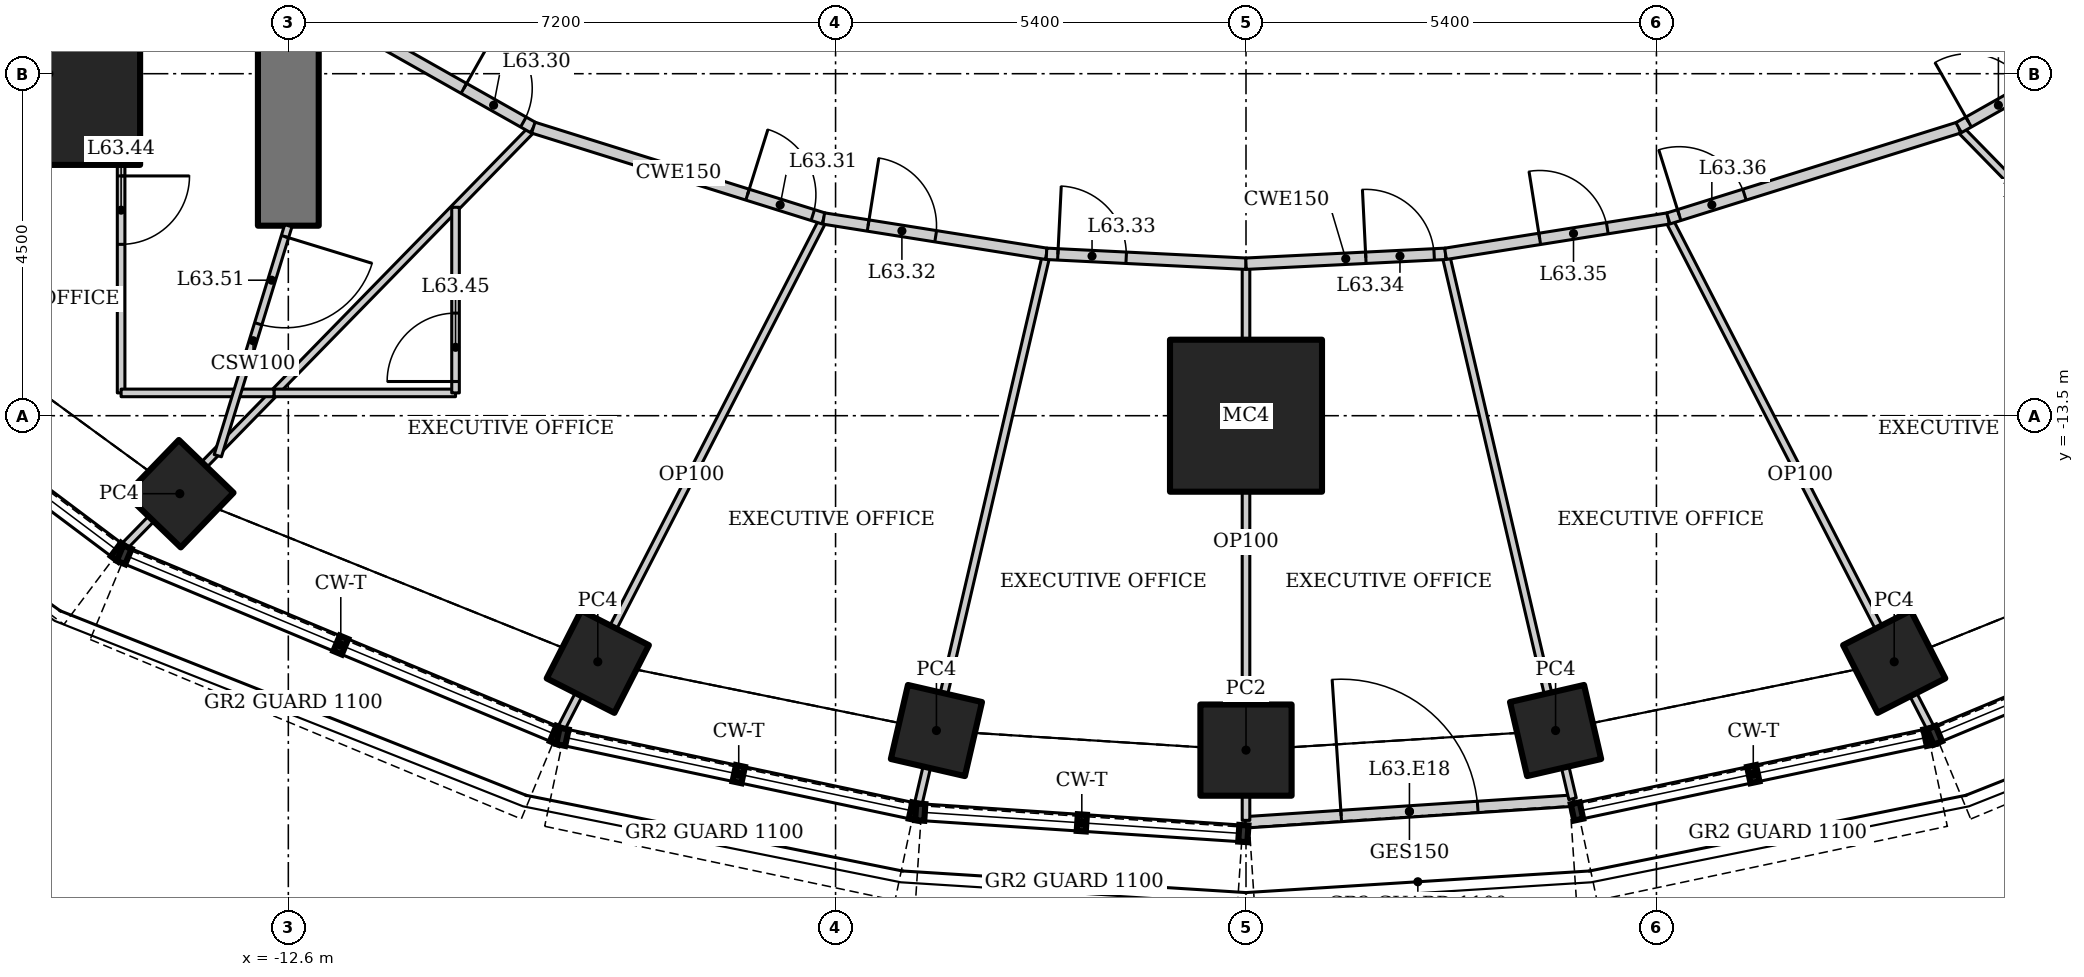
"""IFC4 building model, lengths in metres.
Left out: names, types, materials, properties, quantities, classifications, styles, units other than length and angle.
Written with IfcOpenShell. Run it as: python <this file> out.ifc"""

import sys

from ifc_helpers import new_model, si_unit, direction, frame, frame_2d, origin, origin_2d, place, context, subcontext, project, spatial, rectangle, hollow_rectangle, extrude, element, fill, save


model = new_model("IFC4")
c1 = context("Model", 3, precision=1e-05, world=origin(), true_north=direction((0.0, 1.0)))
c2 = subcontext(c1, "Body", "Model", "MODEL_VIEW")
j1 = project(units=[si_unit("LENGTHUNIT", "METRE"), si_unit("PLANEANGLEUNIT", "RADIAN")], contexts=[c1])
p1 = place(None, origin())
s1 = spatial("IfcSite", under=j1, at=p1, CompositionType="ELEMENT")
p2 = place(p1, origin())
s2 = spatial("IfcBuilding", under=s1, at=p2, CompositionType="ELEMENT")
p3 = place(p2, frame((0.0, 0.0, 270.4)))
s3 = spatial("IfcBuildingStorey", under=s2, at=p3, CompositionType="ELEMENT", Elevation=270.4)
p4 = place(p3, frame((-15.75, -9.0, 0.0), z_axis=(0.0, 0.0, 1.0), x_axis=(1.0, 0.0, 0.0)))
e1 = element("IfcColumn", 1, at=p4, inside=s3, PredefinedType="COLUMN", context=c2, shape_type="SweptSolid", body=[
    extrude(hollow_rectangle(XDim=2.4, YDim=2.4, WallThickness=0.12, at=origin_2d()), origin(), (0.0, 0.0, 1.0), 4.5),
])
p5 = place(p3, frame((0.0, -13.5, 0.0), z_axis=(0.0, 0.0, 1.0), x_axis=(1.0, 0.0, 0.0)))
e2 = element("IfcColumn", 2, at=p5, inside=s3, PredefinedType="COLUMN", context=c2, shape_type="SweptSolid", body=[
    extrude(hollow_rectangle(XDim=2.0, YDim=2.0, WallThickness=0.15, at=origin_2d()), origin(), (0.0, 0.0, 1.0), 4.5),
])
p6 = place(p3, frame((-14.028, -14.526, 0.947), z_axis=(0.0, 0.0, 1.0), x_axis=(0.694658370459, 0.719339800339, 0.0)))
e3 = element("IfcColumn", 3, at=p6, inside=s3, PredefinedType="COLUMN", context=c2, shape_type="SweptSolid", body=[
    extrude(hollow_rectangle(XDim=1.0, YDim=1.0, WallThickness=0.08, at=origin_2d()), origin(), (0.0, 0.0, 1.0), 3.553),
])
p7 = place(p3, frame((-8.528, -16.738, 0.969), z_axis=(0.0, 0.0, 1.0), x_axis=(0.45399049974, 0.891006524188, 0.0)))
e4 = element("IfcColumn", 4, at=p7, inside=s3, PredefinedType="COLUMN", context=c2, shape_type="SweptSolid", body=[
    extrude(hollow_rectangle(XDim=1.0, YDim=1.0, WallThickness=0.08, at=origin_2d()), origin(), (0.0, 0.0, 1.0), 3.531),
])
p8 = place(p3, frame((-4.073, -17.642, 0.979), z_axis=(0.0, 0.0, 1.0), x_axis=(0.224951054344, 0.974370064785, 0.0)))
e5 = element("IfcColumn", 5, at=p8, inside=s3, PredefinedType="COLUMN", context=c2, shape_type="SweptSolid", body=[
    extrude(hollow_rectangle(XDim=1.0, YDim=1.0, WallThickness=0.08, at=origin_2d()), origin(), (0.0, 0.0, 1.0), 3.521),
])
p9 = place(p3, frame((0.0, -17.9, 1.178), z_axis=(0.0, 0.0, 1.0), x_axis=(1.0, 0.0, 0.0)))
e6 = element("IfcColumn", 6, at=p9, inside=s3, PredefinedType="COLUMN", context=c2, shape_type="SweptSolid", body=[
    extrude(hollow_rectangle(XDim=1.2, YDim=1.2, WallThickness=0.1, at=origin_2d()), origin(), (0.0, 0.0, 1.0), 3.322),
])
p10 = place(p3, frame((4.073, -17.642, 0.979), z_axis=(0.0, 0.0, 1.0), x_axis=(0.974370064785, 0.224951054344, 0.0)))
e7 = element("IfcColumn", 7, at=p10, inside=s3, PredefinedType="COLUMN", context=c2, shape_type="SweptSolid", body=[
    extrude(hollow_rectangle(XDim=1.0, YDim=1.0, WallThickness=0.08, at=origin_2d()), origin(), (0.0, 0.0, 1.0), 3.521),
])
p11 = place(p3, frame((8.528, -16.738, 0.969), z_axis=(0.0, 0.0, 1.0), x_axis=(0.891006524188, 0.45399049974, 0.0)))
e8 = element("IfcColumn", 8, at=p11, inside=s3, PredefinedType="COLUMN", context=c2, shape_type="SweptSolid", body=[
    extrude(hollow_rectangle(XDim=1.0, YDim=1.0, WallThickness=0.08, at=origin_2d()), origin(), (0.0, 0.0, 1.0), 3.531),
])
p12 = place(p3, frame((-12.6, 11.0, 0.0), z_axis=(0.0, 0.0, 1.0), x_axis=(0.0, -1.0, 0.0)))
e9 = element("IfcWall", 9, at=p12, inside=s3, PredefinedType="SHEAR", context=c2, shape_type="SweptSolid", body=[
    extrude(rectangle(XDim=22.0, YDim=0.8, at=frame_2d((11.0, 0.0))), origin(), (0.0, 0.0, 1.0), 4.5),
])
p13 = place(p12, frame((10.1, 0.0, 0.0)))
e10 = element("IfcOpeningElement", 10, at=p13, cuts=e9, PredefinedType="OPENING", context=c2, shape_type="SweptSolid", body=[
    extrude(rectangle(XDim=1.8, YDim=2.1, at=frame_2d((0.9, 1.05))), frame((0.0, 0.41, 0.0), z_axis=(0.0, -1.0, 0.0), x_axis=(1.0, 0.0, 0.0)), (0.0, 0.0, 1.0), 0.82),
])
p14 = place(p3, frame((-0.01, -18.85, 0.0), z_axis=(0.0, 0.0, 1.0), x_axis=(0.997817967506, 0.066025023447, 0.0)))
e11 = element("IfcWall", 11, at=p14, inside=s3, PredefinedType="ELEMENTEDWALL", context=c2, shape_type="SweptSolid", body=[
    extrude(rectangle(XDim=4.33, YDim=0.15, at=frame_2d((2.165, 0.0))), origin(), (0.0, 0.0, 1.0), 4.35),
])
p15 = place(p14, frame((1.265, 0.0, 0.0)))
e12 = element("IfcOpeningElement", 12, at=p15, cuts=e11, PredefinedType="OPENING", context=c2, shape_type="SweptSolid", body=[
    extrude(rectangle(XDim=1.8, YDim=2.4, at=frame_2d((0.9, 1.2))), frame((0.0, 0.085, 0.0), z_axis=(0.0, -1.0, 0.0), x_axis=(1.0, 0.0, 0.0)), (0.0, 0.0, 1.0), 0.17),
])
p16 = place(p3, frame((-19.959, -11.355, 0.0), z_axis=(0.0, 0.0, 1.0), x_axis=(0.871035125561, 0.491220734537, 0.0)))
e13 = element("IfcWall", 13, at=p16, inside=s3, PredefinedType="PARTITIONING", context=c2, shape_type="SweptSolid", body=[
    extrude(rectangle(XDim=7.753, YDim=0.1, at=frame_2d((3.877, 0.0))), origin(), (0.0, 0.0, 1.0), 3.824),
])
p17 = place(p3, frame((-14.789, -15.251, 0.0), z_axis=(0.0, 0.0, 1.0), x_axis=(0.698752653188, 0.71536335499, 0.0)))
e14 = element("IfcWall", 14, at=p17, inside=s3, PredefinedType="PARTITIONING", context=c2, shape_type="SweptSolid", body=[
    extrude(rectangle(XDim=7.746, YDim=0.1, at=frame_2d((3.873, 0.0))), origin(), (0.0, 0.0, 1.0), 3.723),
])
p18 = place(p3, frame((-9.031, -17.657, 0.0), z_axis=(0.0, 0.0, 1.0), x_axis=(0.457536153323, 0.889191019074, 0.0)))
e15 = element("IfcWall", 15, at=p18, inside=s3, PredefinedType="PARTITIONING", context=c2, shape_type="SweptSolid", body=[
    extrude(rectangle(XDim=7.594, YDim=0.1, at=frame_2d((3.797, 0.0))), origin(), (0.0, 0.0, 1.0), 3.593),
])
p19 = place(p3, frame((-4.324, -18.657, 0.0), z_axis=(0.0, 0.0, 1.0), x_axis=(0.227020232271, 0.973890042119, 0.0)))
e16 = element("IfcWall", 16, at=p19, inside=s3, PredefinedType="PARTITIONING", context=c2, shape_type="SweptSolid", body=[
    extrude(rectangle(XDim=7.483, YDim=0.1, at=frame_2d((3.741, 0.0))), origin(), (0.0, 0.0, 1.0), 3.593),
])
p20 = place(p3, frame((0.0, -18.825, 0.0), z_axis=(0.0, 0.0, 1.0), x_axis=(0.0, 1.0, 0.0)))
e17 = element("IfcWall", 17, at=p20, inside=s3, PredefinedType="PARTITIONING", context=c2, shape_type="SweptSolid", body=[
    extrude(rectangle(XDim=7.325, YDim=0.1, at=frame_2d((3.662, 0.0))), origin(), (0.0, 0.0, 1.0), 3.944),
])
p21 = place(p3, frame((4.296, -18.54, 0.0), z_axis=(0.0, 0.0, 1.0), x_axis=(-0.227009478686, 0.973892548789, 0.0)))
e18 = element("IfcWall", 18, at=p21, inside=s3, PredefinedType="PARTITIONING", context=c2, shape_type="SweptSolid", body=[
    extrude(rectangle(XDim=7.363, YDim=0.1, at=frame_2d((3.681, 0.0))), origin(), (0.0, 0.0, 1.0), 3.593),
])
p22 = place(p3, frame((9.031, -17.657, 0.0), z_axis=(0.0, 0.0, 1.0), x_axis=(-0.457536153323, 0.889191019074, 0.0)))
e19 = element("IfcWall", 19, at=p22, inside=s3, PredefinedType="PARTITIONING", context=c2, shape_type="SweptSolid", body=[
    extrude(rectangle(XDim=7.594, YDim=0.1, at=frame_2d((3.797, 0.0))), origin(), (0.0, 0.0, 1.0), 3.593),
])
p23 = place(p3, frame((14.789, -15.251, 0.0), z_axis=(0.0, 0.0, 1.0), x_axis=(-0.698752653188, 0.71536335499, 0.0)))
e20 = element("IfcWall", 20, at=p23, inside=s3, PredefinedType="PARTITIONING", context=c2, shape_type="SweptSolid", body=[
    extrude(rectangle(XDim=7.746, YDim=0.1, at=frame_2d((3.873, 0.0))), origin(), (0.0, 0.0, 1.0), 3.723),
])
p24 = place(p3, frame((-13.206, -7.546, 0.0), z_axis=(0.0, 0.0, 1.0), x_axis=(0.870593853694, -0.492002379984, 0.0)))
e21 = element("IfcWall", 21, at=p24, inside=s3, PredefinedType="PARTITIONING", context=c2, shape_type="SweptSolid", body=[
    extrude(rectangle(XDim=4.398, YDim=0.15, at=frame_2d((2.199, 0.0))), origin(), (0.0, 0.0, 1.0), 4.35),
])
p25 = place(p24, frame((3.348, 0.0, 0.0)))
e22 = element("IfcOpeningElement", 22, at=p25, cuts=e21, PredefinedType="OPENING", context=c2, shape_type="SweptSolid", body=[
    extrude(rectangle(XDim=0.9, YDim=2.1, at=frame_2d((0.45, 1.05))), frame((0.0, 0.085, 0.0), z_axis=(0.0, -1.0, 0.0), x_axis=(1.0, 0.0, 0.0)), (0.0, 0.0, 1.0), 0.17),
])
p26 = place(p3, frame((-9.377, -9.71, 0.0), z_axis=(0.0, 0.0, 1.0), x_axis=(0.954393117131, -0.298552806004, 0.0)))
e23 = element("IfcWall", 23, at=p26, inside=s3, PredefinedType="PARTITIONING", context=c2, shape_type="SweptSolid", body=[
    extrude(rectangle(XDim=4.003, YDim=0.15, at=frame_2d((2.001, 0.0))), origin(), (0.0, 0.0, 1.0), 4.35),
])
p27 = place(p26, frame((2.953, 0.0, 0.0)))
e24 = element("IfcOpeningElement", 24, at=p27, cuts=e23, PredefinedType="OPENING", context=c2, shape_type="SweptSolid", body=[
    extrude(rectangle(XDim=0.9, YDim=2.1, at=frame_2d((0.45, 1.05))), frame((0.0, 0.085, 0.0), z_axis=(0.0, -1.0, 0.0), x_axis=(1.0, 0.0, 0.0)), (0.0, 0.0, 1.0), 0.17),
])
p28 = place(p3, frame((-5.556, -10.905, 0.0), z_axis=(0.0, 0.0, 1.0), x_axis=(0.987659371348, -0.156617260185, 0.0)))
e25 = element("IfcWall", 25, at=p28, inside=s3, PredefinedType="PARTITIONING", context=c2, shape_type="SweptSolid", body=[
    extrude(rectangle(XDim=2.968, YDim=0.15, at=frame_2d((1.484, 0.0))), origin(), (0.0, 0.0, 1.0), 4.35),
])
p29 = place(p28, frame((0.592, 0.0, 0.0)))
e26 = element("IfcOpeningElement", 26, at=p29, cuts=e25, PredefinedType="OPENING", context=c2, shape_type="SweptSolid", body=[
    extrude(rectangle(XDim=0.9, YDim=2.1, at=frame_2d((0.45, 1.05))), frame((0.0, 0.085, 0.0), z_axis=(0.0, -1.0, 0.0), x_axis=(1.0, 0.0, 0.0)), (0.0, 0.0, 1.0), 0.17),
])
p30 = place(p3, frame((-2.625, -11.37, 0.0), z_axis=(0.0, 0.0, 1.0), x_axis=(0.99877355978, -0.049511375313, 0.0)))
e27 = element("IfcWall", 27, at=p30, inside=s3, PredefinedType="PARTITIONING", context=c2, shape_type="SweptSolid", body=[
    extrude(rectangle(XDim=2.628, YDim=0.15, at=frame_2d((1.314, 0.0))), origin(), (0.0, 0.0, 1.0), 4.35),
])
p31 = place(p30, frame((0.15, 0.0, 0.0)))
e28 = element("IfcOpeningElement", 28, at=p31, cuts=e27, PredefinedType="OPENING", context=c2, shape_type="SweptSolid", body=[
    extrude(rectangle(XDim=0.9, YDim=2.1, at=frame_2d((0.45, 1.05))), frame((0.0, 0.085, 0.0), z_axis=(0.0, -1.0, 0.0), x_axis=(1.0, 0.0, 0.0)), (0.0, 0.0, 1.0), 0.17),
])
p32 = place(p3, frame((0.0, -11.5, 0.0), z_axis=(0.0, 0.0, 1.0), x_axis=(0.99877355978, 0.049511375313, 0.0)))
e29 = element("IfcWall", 29, at=p32, inside=s3, PredefinedType="PARTITIONING", context=c2, shape_type="SweptSolid", body=[
    extrude(rectangle(XDim=2.628, YDim=0.15, at=frame_2d((1.314, 0.0))), origin(), (0.0, 0.0, 1.0), 4.35),
])
p33 = place(p32, frame((1.578, 0.0, 0.0)))
e30 = element("IfcOpeningElement", 30, at=p33, cuts=e29, PredefinedType="OPENING", context=c2, shape_type="SweptSolid", body=[
    extrude(rectangle(XDim=0.9, YDim=2.1, at=frame_2d((0.45, 1.05))), frame((0.0, 0.085, 0.0), z_axis=(0.0, -1.0, 0.0), x_axis=(1.0, 0.0, 0.0)), (0.0, 0.0, 1.0), 0.17),
])
p34 = place(p3, frame((2.625, -11.37, 0.0), z_axis=(0.0, 0.0, 1.0), x_axis=(0.987659371348, 0.156617260185, 0.0)))
e31 = element("IfcWall", 31, at=p34, inside=s3, PredefinedType="PARTITIONING", context=c2, shape_type="SweptSolid", body=[
    extrude(rectangle(XDim=2.968, YDim=0.15, at=frame_2d((1.484, 0.0))), origin(), (0.0, 0.0, 1.0), 4.35),
])
p35 = place(p34, frame((1.255, 0.0, 0.0)))
e32 = element("IfcOpeningElement", 32, at=p35, cuts=e31, PredefinedType="OPENING", context=c2, shape_type="SweptSolid", body=[
    extrude(rectangle(XDim=0.9, YDim=2.1, at=frame_2d((0.45, 1.05))), frame((0.0, 0.085, 0.0), z_axis=(0.0, -1.0, 0.0), x_axis=(1.0, 0.0, 0.0)), (0.0, 0.0, 1.0), 0.17),
])
p36 = place(p3, frame((5.556, -10.905, 0.0), z_axis=(0.0, 0.0, 1.0), x_axis=(0.954393117131, 0.298552806004, 0.0)))
e33 = element("IfcWall", 33, at=p36, inside=s3, PredefinedType="PARTITIONING", context=c2, shape_type="SweptSolid", body=[
    extrude(rectangle(XDim=4.003, YDim=0.15, at=frame_2d((2.001, 0.0))), origin(), (0.0, 0.0, 1.0), 4.35),
])
p37 = place(p36, frame((0.15, 0.0, 0.0)))
e34 = element("IfcOpeningElement", 34, at=p37, cuts=e33, PredefinedType="OPENING", context=c2, shape_type="SweptSolid", body=[
    extrude(rectangle(XDim=0.9, YDim=2.1, at=frame_2d((0.45, 1.05))), frame((0.0, 0.085, 0.0), z_axis=(0.0, -1.0, 0.0), x_axis=(1.0, 0.0, 0.0)), (0.0, 0.0, 1.0), 0.17),
])
p38 = place(p3, frame((9.377, -9.71, 0.0), z_axis=(0.0, 0.0, 1.0), x_axis=(0.870593853694, 0.492002379984, 0.0)))
e35 = element("IfcWall", 35, at=p38, inside=s3, PredefinedType="PARTITIONING", context=c2, shape_type="SweptSolid", body=[
    extrude(rectangle(XDim=4.398, YDim=0.15, at=frame_2d((2.199, 0.0))), origin(), (0.0, 0.0, 1.0), 4.35),
])
p39 = place(p38, frame((0.15, 0.0, 0.0)))
e36 = element("IfcOpeningElement", 36, at=p39, cuts=e35, PredefinedType="OPENING", context=c2, shape_type="SweptSolid", body=[
    extrude(rectangle(XDim=0.9, YDim=2.1, at=frame_2d((0.45, 1.05))), frame((0.0, 0.085, 0.0), z_axis=(0.0, -1.0, 0.0), x_axis=(1.0, 0.0, 0.0)), (0.0, 0.0, 1.0), 0.17),
])
p40 = place(p3, frame((-14.8, -8.445, 0.0), z_axis=(0.0, 0.0, 1.0), x_axis=(0.0, -1.0, 0.0)))
e37 = element("IfcWall", 37, at=p40, inside=s3, PredefinedType="PARTITIONING", context=c2, shape_type="SweptSolid", body=[
    extrude(rectangle(XDim=4.755, YDim=0.1, at=frame_2d((2.377, 0.0))), origin(), (0.0, 0.0, 1.0), 4.35),
])
p41 = place(p40, frame((1.9, 0.0, 0.0)))
e38 = element("IfcOpeningElement", 38, at=p41, cuts=e37, PredefinedType="OPENING", context=c2, shape_type="SweptSolid", body=[
    extrude(rectangle(XDim=0.9, YDim=2.1, at=frame_2d((0.45, 1.05))), frame((0.0, 0.06, 0.0), z_axis=(0.0, -1.0, 0.0), x_axis=(1.0, 0.0, 0.0)), (0.0, 0.0, 1.0), 0.12),
])
p42 = place(p3, frame((-14.8, -13.2, 0.0), z_axis=(0.0, 0.0, 1.0), x_axis=(1.0, 0.0, 0.0)))
e39 = element("IfcWall", 39, at=p42, inside=s3, PredefinedType="PARTITIONING", context=c2, shape_type="SweptSolid", body=[
    extrude(rectangle(XDim=2.014, YDim=0.1, at=frame_2d((1.007, 0.0))), origin(), (0.0, 0.0, 1.0), 4.35),
])
p43 = place(p3, frame((-12.786, -13.2, 0.0), z_axis=(0.0, 0.0, 1.0), x_axis=(1.0, 0.0, 0.0)))
e40 = element("IfcWall", 40, at=p43, inside=s3, PredefinedType="PARTITIONING", context=c2, shape_type="SweptSolid", body=[
    extrude(rectangle(XDim=2.386, YDim=0.1, at=frame_2d((1.193, 0.0))), origin(), (0.0, 0.0, 1.0), 4.35),
])
p44 = place(p3, frame((-10.4, -13.2, 0.0), z_axis=(0.0, 0.0, 1.0), x_axis=(0.0, 1.0, 0.0)))
e41 = element("IfcWall", 41, at=p44, inside=s3, PredefinedType="PARTITIONING", context=c2, shape_type="SweptSolid", body=[
    extrude(rectangle(XDim=2.442, YDim=0.1, at=frame_2d((1.221, 0.0))), origin(), (0.0, 0.0, 1.0), 4.35),
])
p45 = place(p44, frame((0.15, 0.0, 0.0)))
e42 = element("IfcOpeningElement", 42, at=p45, cuts=e41, PredefinedType="OPENING", context=c2, shape_type="SweptSolid", body=[
    extrude(rectangle(XDim=0.9, YDim=2.1, at=frame_2d((0.45, 1.05))), frame((0.0, 0.06, 0.0), z_axis=(0.0, -1.0, 0.0), x_axis=(1.0, 0.0, 0.0)), (0.0, 0.0, 1.0), 0.12),
])
p46 = place(p3, frame((-12.6, -11.0, 0.0), z_axis=(0.0, 0.0, 1.0), x_axis=(-0.293039542174, -0.95610032252, 0.0)))
e43 = element("IfcWall", 43, at=p46, inside=s3, PredefinedType="PARTITIONING", context=c2, shape_type="SweptSolid", body=[
    extrude(rectangle(XDim=3.165, YDim=0.1, at=frame_2d((1.583, 0.0))), origin(), (0.0, 0.0, 1.0), 4.35),
])
p47 = place(p46, frame((0.15, 0.0, 0.0)))
e44 = element("IfcOpeningElement", 44, at=p47, cuts=e43, PredefinedType="OPENING", context=c2, shape_type="SweptSolid", body=[
    extrude(rectangle(XDim=1.2, YDim=2.1, at=frame_2d((0.6, 1.05))), frame((0.0, 0.06, 0.0), z_axis=(0.0, -1.0, 0.0), x_axis=(1.0, 0.0, 0.0)), (0.0, 0.0, 1.0), 0.12),
])
p48 = place(p15, origin())
e45 = element("IfcDoor", 45, at=p48, inside=s3, OperationType="DOUBLE_DOOR_DOUBLE_SWING", PredefinedType="DOOR", context=c2, shape_type="SweptSolid", body=[
    extrude(rectangle(XDim=1.8, YDim=2.4, at=frame_2d((0.9, 1.2))), frame((0.0, 0.025, 0.0), z_axis=(0.0, -1.0, 0.0), x_axis=(1.0, 0.0, 0.0)), (0.0, 0.0, 1.0), 0.05),
])
fill(e12, e45)
p49 = place(p25, origin())
e46 = element("IfcDoor", 46, at=p49, inside=s3, OperationType="SINGLE_SWING_LEFT", PredefinedType="DOOR", context=c2, shape_type="SweptSolid", body=[
    extrude(rectangle(XDim=0.9, YDim=2.1, at=frame_2d((0.45, 1.05))), frame((0.0, 0.025, 0.0), z_axis=(0.0, -1.0, 0.0), x_axis=(1.0, 0.0, 0.0)), (0.0, 0.0, 1.0), 0.05),
])
fill(e22, e46)
p50 = place(p27, origin())
e47 = element("IfcDoor", 47, at=p50, inside=s3, OperationType="SINGLE_SWING_LEFT", PredefinedType="DOOR", context=c2, shape_type="SweptSolid", body=[
    extrude(rectangle(XDim=0.9, YDim=2.1, at=frame_2d((0.45, 1.05))), frame((0.0, 0.025, 0.0), z_axis=(0.0, -1.0, 0.0), x_axis=(1.0, 0.0, 0.0)), (0.0, 0.0, 1.0), 0.05),
])
fill(e24, e47)
p51 = place(p29, origin())
e48 = element("IfcDoor", 48, at=p51, inside=s3, OperationType="SINGLE_SWING_LEFT", PredefinedType="DOOR", context=c2, shape_type="SweptSolid", body=[
    extrude(rectangle(XDim=0.9, YDim=2.1, at=frame_2d((0.45, 1.05))), frame((0.0, 0.025, 0.0), z_axis=(0.0, -1.0, 0.0), x_axis=(1.0, 0.0, 0.0)), (0.0, 0.0, 1.0), 0.05),
])
fill(e26, e48)
p52 = place(p31, origin())
e49 = element("IfcDoor", 49, at=p52, inside=s3, OperationType="SINGLE_SWING_LEFT", PredefinedType="DOOR", context=c2, shape_type="SweptSolid", body=[
    extrude(rectangle(XDim=0.9, YDim=2.1, at=frame_2d((0.45, 1.05))), frame((0.0, 0.025, 0.0), z_axis=(0.0, -1.0, 0.0), x_axis=(1.0, 0.0, 0.0)), (0.0, 0.0, 1.0), 0.05),
])
fill(e28, e49)
p53 = place(p33, origin())
e50 = element("IfcDoor", 50, at=p53, inside=s3, OperationType="SINGLE_SWING_LEFT", PredefinedType="DOOR", context=c2, shape_type="SweptSolid", body=[
    extrude(rectangle(XDim=0.9, YDim=2.1, at=frame_2d((0.45, 1.05))), frame((0.0, 0.025, 0.0), z_axis=(0.0, -1.0, 0.0), x_axis=(1.0, 0.0, 0.0)), (0.0, 0.0, 1.0), 0.05),
])
fill(e30, e50)
p54 = place(p35, origin())
e51 = element("IfcDoor", 51, at=p54, inside=s3, OperationType="SINGLE_SWING_LEFT", PredefinedType="DOOR", context=c2, shape_type="SweptSolid", body=[
    extrude(rectangle(XDim=0.9, YDim=2.1, at=frame_2d((0.45, 1.05))), frame((0.0, 0.025, 0.0), z_axis=(0.0, -1.0, 0.0), x_axis=(1.0, 0.0, 0.0)), (0.0, 0.0, 1.0), 0.05),
])
fill(e32, e51)
p55 = place(p37, origin())
e52 = element("IfcDoor", 52, at=p55, inside=s3, OperationType="SINGLE_SWING_LEFT", PredefinedType="DOOR", context=c2, shape_type="SweptSolid", body=[
    extrude(rectangle(XDim=0.9, YDim=2.1, at=frame_2d((0.45, 1.05))), frame((0.0, 0.025, 0.0), z_axis=(0.0, -1.0, 0.0), x_axis=(1.0, 0.0, 0.0)), (0.0, 0.0, 1.0), 0.05),
])
fill(e34, e52)
p56 = place(p39, origin())
e53 = element("IfcDoor", 53, at=p56, inside=s3, OperationType="SINGLE_SWING_LEFT", PredefinedType="DOOR", context=c2, shape_type="SweptSolid", body=[
    extrude(rectangle(XDim=0.9, YDim=2.1, at=frame_2d((0.45, 1.05))), frame((0.0, 0.025, 0.0), z_axis=(0.0, -1.0, 0.0), x_axis=(1.0, 0.0, 0.0)), (0.0, 0.0, 1.0), 0.05),
])
fill(e36, e53)
p57 = place(p41, origin())
e54 = element("IfcDoor", 54, at=p57, inside=s3, OperationType="SINGLE_SWING_LEFT", PredefinedType="DOOR", context=c2, shape_type="SweptSolid", body=[
    extrude(rectangle(XDim=0.9, YDim=2.1, at=frame_2d((0.45, 1.05))), frame((0.0, 0.025, 0.0), z_axis=(0.0, -1.0, 0.0), x_axis=(1.0, 0.0, 0.0)), (0.0, 0.0, 1.0), 0.05),
])
fill(e38, e54)
p58 = place(p45, origin())
e55 = element("IfcDoor", 55, at=p58, inside=s3, OperationType="SINGLE_SWING_LEFT", PredefinedType="DOOR", context=c2, shape_type="SweptSolid", body=[
    extrude(rectangle(XDim=0.9, YDim=2.1, at=frame_2d((0.45, 1.05))), frame((0.0, 0.025, 0.0), z_axis=(0.0, -1.0, 0.0), x_axis=(1.0, 0.0, 0.0)), (0.0, 0.0, 1.0), 0.05),
])
fill(e42, e55)
p59 = place(p47, origin())
e56 = element("IfcDoor", 56, at=p59, inside=s3, OperationType="DOUBLE_DOOR_DOUBLE_SWING", PredefinedType="DOOR", context=c2, shape_type="SweptSolid", body=[
    extrude(rectangle(XDim=1.2, YDim=2.1, at=frame_2d((0.6, 1.05))), frame((0.0, 0.025, 0.0), z_axis=(0.0, -1.0, 0.0), x_axis=(1.0, 0.0, 0.0)), (0.0, 0.0, 1.0), 0.05),
])
fill(e44, e56)
save(model, sys.argv[1])
